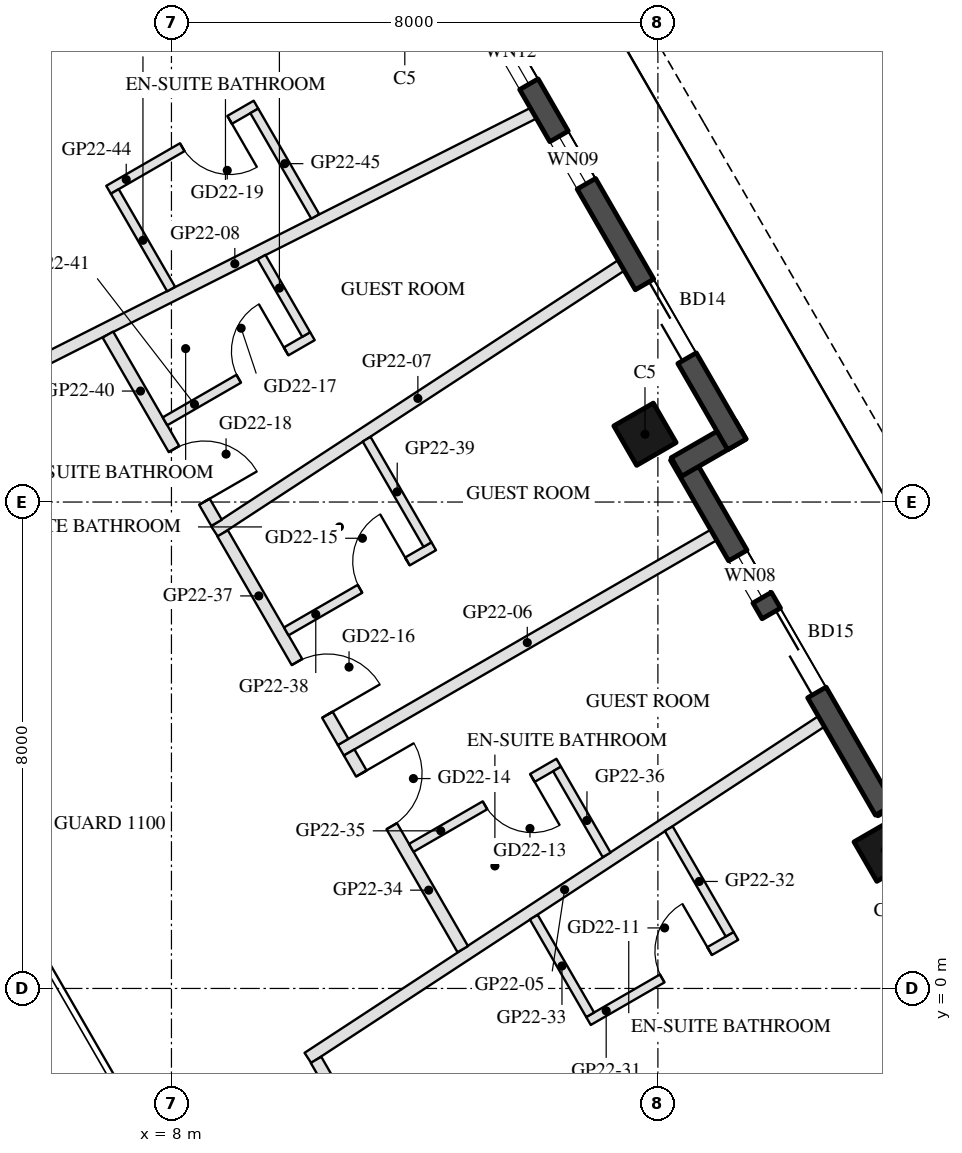
"""IFC4 building model, lengths in metres.
Left out: names, types, materials, properties, quantities, classifications, styles, units other than length and angle.
Written with IfcOpenShell. Run it as: python <this file> out.ifc"""

import sys

from ifc_helpers import new_model, si_unit, direction, frame, frame_2d, origin, origin_2d, place, context, subcontext, project, spatial, rectangle, hollow_rectangle, extrude, element, fill, save


model = new_model("IFC4")
c1 = context("Model", 3, precision=1e-05, world=origin(), true_north=direction((0.0, 1.0)))
c2 = subcontext(c1, "Body", "Model", "MODEL_VIEW")
j1 = project(units=[si_unit("LENGTHUNIT", "METRE"), si_unit("PLANEANGLEUNIT", "RADIAN")], contexts=[c1])
p1 = place(None, origin())
s1 = spatial("IfcSite", under=j1, at=p1, CompositionType="ELEMENT")
p2 = place(p1, origin())
s2 = spatial("IfcBuilding", under=s1, at=p2, CompositionType="ELEMENT")
p3 = place(p2, frame((0.0, 0.0, 228.0)))
s3 = spatial("IfcBuildingStorey", under=s2, at=p3, CompositionType="ELEMENT", Elevation=228.0)
for number, where, z_axis, x_axis in (
    (1, (19.738, 2.273, 0.0), (0.0, 0.0, 1.0), (-0.5, 0.866, 0.0)),
    (2, (15.788, 9.115, 0.0), (0.0, 0.0, 1.0), (-0.5, 0.866, 0.0)),
):
    element("IfcColumn", number, at=place(p3, frame(where, z_axis=z_axis, x_axis=x_axis)), inside=s3, PredefinedType="COLUMN", context=c2, shape_type="SweptSolid", body=[
        extrude(hollow_rectangle(XDim=0.75, YDim=0.75, WallThickness=0.035, at=origin_2d()), origin(), (0.0, 0.0, 1.0), 3.7),
    ])
p4 = place(p3, frame((20.588, 3.601, 0.0), z_axis=(0.0, 0.0, 1.0), x_axis=(-0.866005645448, -0.500034220881, 0.0)))
e3 = element("IfcWall", 3, at=p4, inside=s3, PredefinedType="SOLIDWALL", context=c2, shape_type="SweptSolid", body=[
    extrude(rectangle(XDim=1.22, YDim=0.35, at=frame_2d((0.61, 0.0))), origin(), (0.0, 0.0, 1.0), 3.45),
])
p5 = place(p3, frame((19.729, 2.938, 0.0), z_axis=(0.0, 0.0, 1.0), x_axis=(-0.499976430342, 0.866039011305, 0.0)))
e4 = element("IfcWall", 4, at=p5, inside=s3, PredefinedType="SOLIDWALL", context=c2, shape_type="SweptSolid", body=[
    extrude(rectangle(XDim=6.74, YDim=0.35, at=frame_2d((3.37, 0.0))), origin(), (0.0, 0.0, 1.0), 3.45),
])
p6 = place(p5, frame((2.229, 0.0, 0.0)))
e5 = element("IfcOpeningElement", 5, at=p6, cuts=e4, PredefinedType="OPENING", context=c2, shape_type="SweptSolid", body=[
    extrude(rectangle(XDim=1.5, YDim=2.4, at=frame_2d((0.75, 1.2))), frame((0.0, 0.185, 0.0), z_axis=(0.0, -1.0, 0.0), x_axis=(1.0, 0.0, 0.0)), (0.0, 0.0, 1.0), 0.37),
])
p7 = place(p5, frame((4.029, 0.0, 0.3)))
e6 = element("IfcOpeningElement", 6, at=p7, cuts=e4, PredefinedType="OPENING", context=c2, shape_type="SweptSolid", body=[
    extrude(rectangle(XDim=0.8, YDim=2.65, at=frame_2d((0.4, 1.325))), frame((0.0, 0.185, 0.0), z_axis=(0.0, -1.0, 0.0), x_axis=(1.0, 0.0, 0.0)), (0.0, 0.0, 1.0), 0.37),
])
p8 = place(p3, frame((16.306, 8.577, 0.0), z_axis=(0.0, 0.0, 1.0), x_axis=(0.866092288191, 0.499884134912, 0.0)))
e7 = element("IfcWall", 7, at=p8, inside=s3, PredefinedType="SOLIDWALL", context=c2, shape_type="SweptSolid", body=[
    extrude(rectangle(XDim=1.22, YDim=0.35, at=frame_2d((0.61, 0.0))), origin(), (0.0, 0.0, 1.0), 3.45),
])
p9 = place(p3, frame((17.299, 8.948, 0.0), z_axis=(0.0, 0.0, 1.0), x_axis=(-0.500010041276, 0.866019606374, 0.0)))
e8 = element("IfcWall", 8, at=p9, inside=s3, PredefinedType="SOLIDWALL", context=c2, shape_type="SweptSolid", body=[
    extrude(rectangle(XDim=9.7, YDim=0.35, at=frame_2d((4.85, 0.0))), origin(), (0.0, 0.0, 1.0), 3.45),
])
p10 = place(p9, frame((1.637, 0.0, 0.0)))
e9 = element("IfcOpeningElement", 9, at=p10, cuts=e8, PredefinedType="OPENING", context=c2, shape_type="SweptSolid", body=[
    extrude(rectangle(XDim=1.4, YDim=2.4, at=frame_2d((0.7, 1.2))), frame((0.0, 0.185, 0.0), z_axis=(0.0, -1.0, 0.0), x_axis=(1.0, 0.0, 0.0)), (0.0, 0.0, 1.0), 0.37),
])
p11 = place(p9, frame((4.949, 0.0, 0.3)))
e10 = element("IfcOpeningElement", 10, at=p11, cuts=e8, PredefinedType="OPENING", context=c2, shape_type="SweptSolid", body=[
    extrude(rectangle(XDim=0.9, YDim=2.65, at=frame_2d((0.45, 1.325))), frame((0.0, 0.185, 0.0), z_axis=(0.0, -1.0, 0.0), x_axis=(1.0, 0.0, 0.0)), (0.0, 0.0, 1.0), 0.37),
])
p12 = place(p9, frame((6.84, 0.0, 0.3)))
e11 = element("IfcOpeningElement", 11, at=p12, cuts=e8, PredefinedType="OPENING", context=c2, shape_type="SweptSolid", body=[
    extrude(rectangle(XDim=1.2, YDim=2.65, at=frame_2d((0.6, 1.325))), frame((0.0, 0.185, 0.0), z_axis=(0.0, -1.0, 0.0), x_axis=(1.0, 0.0, 0.0)), (0.0, 0.0, 1.0), 0.37),
])
p13 = place(p3, frame((18.688, 4.391, 0.0), z_axis=(0.0, 0.0, 1.0), x_axis=(-0.836395760685, -0.548126017909, 0.0)))
e12 = element("IfcWall", 12, at=p13, inside=s3, PredefinedType="PARTITIONING", context=c2, shape_type="SweptSolid", body=[
    extrude(rectangle(XDim=10.096, YDim=0.2, at=frame_2d((5.048, 0.0))), origin(), (0.0, 0.0, 1.0), 2.96),
])
p14 = place(p3, frame((16.917, 7.458, 0.0), z_axis=(0.0, 0.0, 1.0), x_axis=(-0.866019052629, -0.500011000363, 0.0)))
e13 = element("IfcWall", 13, at=p14, inside=s3, PredefinedType="PARTITIONING", context=c2, shape_type="SweptSolid", body=[
    extrude(rectangle(XDim=7.08, YDim=0.2, at=frame_2d((3.54, 0.0))), origin(), (0.0, 0.0, 1.0), 2.96),
])
p15 = place(p3, frame((15.397, 11.892, 0.0), z_axis=(0.0, 0.0, 1.0), x_axis=(-0.836905569615, -0.547347300667, 0.0)))
e14 = element("IfcWall", 14, at=p15, inside=s3, PredefinedType="PARTITIONING", context=c2, shape_type="SweptSolid", body=[
    extrude(rectangle(XDim=7.992, YDim=0.2, at=frame_2d((3.996, 0.0))), origin(), (0.0, 0.0, 1.0), 2.96),
])
p16 = place(p3, frame((13.952, 14.395, 0.0), z_axis=(0.0, 0.0, 1.0), x_axis=(-0.892890171934, -0.450274517226, 0.0)))
e15 = element("IfcWall", 15, at=p16, inside=s3, PredefinedType="PARTITIONING", context=c2, shape_type="SweptSolid", body=[
    extrude(rectangle(XDim=10.998, YDim=0.2, at=frame_2d((5.499, 0.0))), origin(), (0.0, 0.0, 1.0), 2.96),
])
p17 = place(p3, frame((10.377, -1.174, 0.0), z_axis=(0.0, 0.0, 1.0), x_axis=(0.500033471514, -0.866006078134, 0.0)))
e16 = element("IfcWall", 16, at=p17, inside=s3, PredefinedType="PARTITIONING", context=c2, shape_type="SweptSolid", body=[
    extrude(rectangle(XDim=3.782, YDim=0.2, at=frame_2d((1.891, 0.0))), origin(), (0.0, 0.0, 1.0), 2.76),
])
p18 = place(p17, frame((1.391, 0.0, 0.0)))
e17 = element("IfcOpeningElement", 17, at=p18, cuts=e16, PredefinedType="OPENING", context=c2, shape_type="SweptSolid", body=[
    extrude(rectangle(XDim=1.0, YDim=2.1, at=frame_2d((0.5, 1.05))), frame((0.0, 0.11, 0.0), z_axis=(0.0, -1.0, 0.0), x_axis=(1.0, 0.0, 0.0)), (0.0, 0.0, 1.0), 0.22),
])
p19 = place(p3, frame((14.858, -0.536, 0.0), z_axis=(0.0, 0.0, 1.0), x_axis=(0.866056369097, 0.49994636267, 0.0)))
e18 = element("IfcWall", 18, at=p19, inside=s3, PredefinedType="PARTITIONING", context=c2, shape_type="SweptSolid", body=[
    extrude(rectangle(XDim=2.8, YDim=0.15, at=frame_2d((1.4, 0.0))), origin(), (0.0, 0.0, 1.0), 2.76),
])
p20 = place(p19, frame((1.4, 0.0, 0.0)))
e19 = element("IfcOpeningElement", 19, at=p20, cuts=e18, PredefinedType="OPENING", context=c2, shape_type="SweptSolid", body=[
    extrude(rectangle(XDim=0.9, YDim=2.1, at=frame_2d((0.45, 1.05))), frame((0.0, 0.085, 0.0), z_axis=(0.0, -1.0, 0.0), x_axis=(1.0, 0.0, 0.0)), (0.0, 0.0, 1.0), 0.17),
])
p21 = place(p3, frame((17.181, 0.892, 0.0), z_axis=(0.0, 0.0, 1.0), x_axis=(-0.500056363668, 0.86599285976, 0.0)))
e20 = element("IfcWall", 20, at=p21, inside=s3, PredefinedType="PARTITIONING", context=c2, shape_type="SweptSolid", body=[
    extrude(rectangle(XDim=2.004, YDim=0.15, at=frame_2d((1.002, 0.0))), origin(), (0.0, 0.0, 1.0), 2.76),
])
p22 = place(p3, frame((14.886, -0.433, 0.0), z_axis=(0.0, 0.0, 1.0), x_axis=(-0.500075767815, 0.865981654797, 0.0)))
e21 = element("IfcWall", 21, at=p22, inside=s3, PredefinedType="PARTITIONING", context=c2, shape_type="SweptSolid", body=[
    extrude(rectangle(XDim=1.854, YDim=0.15, at=frame_2d((0.927, 0.0))), origin(), (0.0, 0.0, 1.0), 2.76),
])
p23 = place(p3, frame((10.923, 3.881, 0.0), z_axis=(0.0, 0.0, 1.0), x_axis=(0.499997756806, -0.866026698889, 0.0)))
e22 = element("IfcWall", 22, at=p23, inside=s3, PredefinedType="PARTITIONING", context=c2, shape_type="SweptSolid", body=[
    extrude(rectangle(XDim=3.736, YDim=0.2, at=frame_2d((1.868, 0.0))), origin(), (0.0, 0.0, 1.0), 2.76),
])
p24 = place(p23, frame((0.4, 0.0, 0.0)))
e23 = element("IfcOpeningElement", 23, at=p24, cuts=e22, PredefinedType="OPENING", context=c2, shape_type="SweptSolid", body=[
    extrude(rectangle(XDim=1.0, YDim=2.1, at=frame_2d((0.5, 1.05))), frame((0.0, 0.11, 0.0), z_axis=(0.0, -1.0, 0.0), x_axis=(1.0, 0.0, 0.0)), (0.0, 0.0, 1.0), 0.22),
])
p25 = place(p3, frame((14.369, 3.712, 0.0), z_axis=(0.0, 0.0, 1.0), x_axis=(-0.866034573852, -0.49998411664, 0.0)))
e24 = element("IfcWall", 24, at=p25, inside=s3, PredefinedType="PARTITIONING", context=c2, shape_type="SweptSolid", body=[
    extrude(rectangle(XDim=2.8, YDim=0.15, at=frame_2d((1.4, 0.0))), origin(), (0.0, 0.0, 1.0), 2.76),
])
p26 = place(p25, frame((0.5, 0.0, 0.0)))
e25 = element("IfcOpeningElement", 25, at=p26, cuts=e24, PredefinedType="OPENING", context=c2, shape_type="SweptSolid", body=[
    extrude(rectangle(XDim=0.9, YDim=2.1, at=frame_2d((0.45, 1.05))), frame((0.0, 0.085, 0.0), z_axis=(0.0, -1.0, 0.0), x_axis=(1.0, 0.0, 0.0)), (0.0, 0.0, 1.0), 0.17),
])
p27 = place(p3, frame((15.157, 2.197, 0.0), z_axis=(0.0, 0.0, 1.0), x_axis=(-0.500033287521, 0.866006184372, 0.0)))
e26 = element("IfcWall", 26, at=p27, inside=s3, PredefinedType="PARTITIONING", context=c2, shape_type="SweptSolid", body=[
    extrude(rectangle(XDim=1.632, YDim=0.15, at=frame_2d((0.816, 0.0))), origin(), (0.0, 0.0, 1.0), 2.76),
])
p28 = place(p3, frame((8.842, 7.485, 0.0), z_axis=(0.0, 0.0, 1.0), x_axis=(0.500030109098, -0.866008019591, 0.0)))
e27 = element("IfcWall", 27, at=p28, inside=s3, PredefinedType="PARTITIONING", context=c2, shape_type="SweptSolid", body=[
    extrude(rectangle(XDim=3.961, YDim=0.2, at=frame_2d((1.98, 0.0))), origin(), (0.0, 0.0, 1.0), 2.76),
])
p29 = place(p28, frame((2.444, 0.0, 0.0)))
e28 = element("IfcOpeningElement", 28, at=p29, cuts=e27, PredefinedType="OPENING", context=c2, shape_type="SweptSolid", body=[
    extrude(rectangle(XDim=1.0, YDim=2.1, at=frame_2d((0.5, 1.05))), frame((0.0, 0.11, 0.0), z_axis=(0.0, -1.0, 0.0), x_axis=(1.0, 0.0, 0.0)), (0.0, 0.0, 1.0), 0.22),
])
p30 = place(p3, frame((9.888, 5.873, 0.0), z_axis=(0.0, 0.0, 1.0), x_axis=(0.866034573852, 0.49998411664, 0.0)))
e29 = element("IfcWall", 29, at=p30, inside=s3, PredefinedType="PARTITIONING", context=c2, shape_type="SweptSolid", body=[
    extrude(rectangle(XDim=2.8, YDim=0.15, at=frame_2d((1.4, 0.0))), origin(), (0.0, 0.0, 1.0), 2.76),
])
p31 = place(p30, frame((1.4, 0.0, 0.0)))
e30 = element("IfcOpeningElement", 30, at=p31, cuts=e29, PredefinedType="OPENING", context=c2, shape_type="SweptSolid", body=[
    extrude(rectangle(XDim=0.9, YDim=2.1, at=frame_2d((0.45, 1.05))), frame((0.0, 0.085, 0.0), z_axis=(0.0, -1.0, 0.0), x_axis=(1.0, 0.0, 0.0)), (0.0, 0.0, 1.0), 0.17),
])
p32 = place(p3, frame((12.211, 7.3, 0.0), z_axis=(0.0, 0.0, 1.0), x_axis=(-0.499982900776, 0.866035275801, 0.0)))
e31 = element("IfcWall", 31, at=p32, inside=s3, PredefinedType="PARTITIONING", context=c2, shape_type="SweptSolid", body=[
    extrude(rectangle(XDim=2.001, YDim=0.15, at=frame_2d((1.001, 0.0))), origin(), (0.0, 0.0, 1.0), 3.45),
])
p33 = place(p3, frame((6.955, 10.754, 0.0), z_axis=(0.0, 0.0, 1.0), x_axis=(0.500018099276, -0.86601495391, 0.0)))
e32 = element("IfcWall", 32, at=p33, inside=s3, PredefinedType="PARTITIONING", context=c2, shape_type="SweptSolid", body=[
    extrude(rectangle(XDim=3.574, YDim=0.2, at=frame_2d((1.787, 0.0))), origin(), (0.0, 0.0, 1.0), 2.76),
])
p34 = place(p33, frame((2.174, 0.0, 0.0)))
e33 = element("IfcOpeningElement", 33, at=p34, cuts=e32, PredefinedType="OPENING", context=c2, shape_type="SweptSolid", body=[
    extrude(rectangle(XDim=1.0, YDim=2.1, at=frame_2d((0.5, 1.05))), frame((0.0, 0.11, 0.0), z_axis=(0.0, -1.0, 0.0), x_axis=(1.0, 0.0, 0.0)), (0.0, 0.0, 1.0), 0.22),
])
p35 = place(p3, frame((7.894, 9.327, 0.0), z_axis=(0.0, 0.0, 1.0), x_axis=(0.865996816683, 0.500049511043, 0.0)))
e34 = element("IfcWall", 34, at=p35, inside=s3, PredefinedType="PARTITIONING", context=c2, shape_type="SweptSolid", body=[
    extrude(rectangle(XDim=2.8, YDim=0.15, at=frame_2d((1.4, 0.0))), origin(), (0.0, 0.0, 1.0), 2.76),
])
p36 = place(p35, frame((1.4, 0.0, 0.0)))
e35 = element("IfcOpeningElement", 35, at=p36, cuts=e34, PredefinedType="OPENING", context=c2, shape_type="SweptSolid", body=[
    extrude(rectangle(XDim=0.9, YDim=2.1, at=frame_2d((0.45, 1.05))), frame((0.0, 0.085, 0.0), z_axis=(0.0, -1.0, 0.0), x_axis=(1.0, 0.0, 0.0)), (0.0, 0.0, 1.0), 0.17),
])
p37 = place(p3, frame((10.216, 10.755, 0.0), z_axis=(0.0, 0.0, 1.0), x_axis=(-0.50001473959, 0.866016893711, 0.0)))
e36 = element("IfcWall", 36, at=p37, inside=s3, PredefinedType="PARTITIONING", context=c2, shape_type="SweptSolid", body=[
    extrude(rectangle(XDim=1.47, YDim=0.15, at=frame_2d((0.735, 0.0))), origin(), (0.0, 0.0, 1.0), 3.45),
])
p38 = place(p3, frame((9.39, 14.536, 0.0), z_axis=(0.0, 0.0, 1.0), x_axis=(-0.866034573852, -0.49998411664, 0.0)))
e37 = element("IfcWall", 37, at=p38, inside=s3, PredefinedType="PARTITIONING", context=c2, shape_type="SweptSolid", body=[
    extrude(rectangle(XDim=2.8, YDim=0.15, at=frame_2d((1.4, 0.0))), origin(), (0.0, 0.0, 1.0), 2.76),
])
p39 = place(p38, frame((0.5, 0.0, 0.0)))
e38 = element("IfcOpeningElement", 38, at=p39, cuts=e37, PredefinedType="OPENING", context=c2, shape_type="SweptSolid", body=[
    extrude(rectangle(XDim=0.9, YDim=2.1, at=frame_2d((0.45, 1.05))), frame((0.0, 0.085, 0.0), z_axis=(0.0, -1.0, 0.0), x_axis=(1.0, 0.0, 0.0)), (0.0, 0.0, 1.0), 0.17),
])
p40 = place(p3, frame((10.365, 12.698, 0.0), z_axis=(0.0, 0.0, 1.0), x_axis=(-0.500056363668, 0.86599285976, 0.0)))
e39 = element("IfcWall", 39, at=p40, inside=s3, PredefinedType="PARTITIONING", context=c2, shape_type="SweptSolid", body=[
    extrude(rectangle(XDim=2.004, YDim=0.15, at=frame_2d((1.002, 0.0))), origin(), (0.0, 0.0, 1.0), 2.76),
])
p41 = place(p3, frame((7.995, 11.502, 0.0), z_axis=(0.0, 0.0, 1.0), x_axis=(-0.4999770169, 0.866038672677, 0.0)))
e40 = element("IfcWall", 40, at=p41, inside=s3, PredefinedType="PARTITIONING", context=c2, shape_type="SweptSolid", body=[
    extrude(rectangle(XDim=1.854, YDim=0.15, at=frame_2d((0.927, 0.0))), origin(), (0.0, 0.0, 1.0), 2.76),
])
p42 = place(p6, frame((1.5, 0.0, 0.0), z_axis=(0.0, 0.0, 1.0), x_axis=(-1.0, 0.0, 0.0)))
e41 = element("IfcDoor", 41, at=p42, inside=s3, OperationType="SLIDING_TO_LEFT", PredefinedType="DOOR", context=c2, shape_type="SweptSolid", body=[
    extrude(rectangle(XDim=1.5, YDim=2.4, at=frame_2d((0.75, 1.2))), frame((0.0, 0.025, 0.0), z_axis=(0.0, -1.0, 0.0), x_axis=(1.0, 0.0, 0.0)), (0.0, 0.0, 1.0), 0.05),
])
fill(e5, e41)
p43 = place(p7, origin())
e42 = element("IfcWindow", 42, at=p43, inside=s3, PartitioningType="SINGLE_PANEL", PredefinedType="WINDOW", context=c2, shape_type="SweptSolid", body=[
    extrude(rectangle(XDim=0.8, YDim=2.65, at=frame_2d((0.4, 1.325))), frame((0.0, 0.03, 0.0), z_axis=(0.0, -1.0, 0.0), x_axis=(1.0, 0.0, 0.0)), (0.0, 0.0, 1.0), 0.06),
])
fill(e6, e42)
p44 = place(p10, frame((1.4, 0.0, 0.0), z_axis=(0.0, 0.0, 1.0), x_axis=(-1.0, 0.0, 0.0)))
e43 = element("IfcDoor", 43, at=p44, inside=s3, OperationType="SLIDING_TO_LEFT", PredefinedType="DOOR", context=c2, shape_type="SweptSolid", body=[
    extrude(rectangle(XDim=1.4, YDim=2.4, at=frame_2d((0.7, 1.2))), frame((0.0, 0.025, 0.0), z_axis=(0.0, -1.0, 0.0), x_axis=(1.0, 0.0, 0.0)), (0.0, 0.0, 1.0), 0.05),
])
fill(e9, e43)
p45 = place(p11, origin())
e44 = element("IfcWindow", 44, at=p45, inside=s3, PartitioningType="SINGLE_PANEL", PredefinedType="WINDOW", context=c2, shape_type="SweptSolid", body=[
    extrude(rectangle(XDim=0.9, YDim=2.65, at=frame_2d((0.45, 1.325))), frame((0.0, 0.03, 0.0), z_axis=(0.0, -1.0, 0.0), x_axis=(1.0, 0.0, 0.0)), (0.0, 0.0, 1.0), 0.06),
])
fill(e10, e44)
p46 = place(p12, origin())
e45 = element("IfcWindow", 45, at=p46, inside=s3, PartitioningType="SINGLE_PANEL", PredefinedType="WINDOW", context=c2, shape_type="SweptSolid", body=[
    extrude(rectangle(XDim=1.2, YDim=2.65, at=frame_2d((0.6, 1.325))), frame((0.0, 0.03, 0.0), z_axis=(0.0, -1.0, 0.0), x_axis=(1.0, 0.0, 0.0)), (0.0, 0.0, 1.0), 0.06),
])
fill(e11, e45)
p47 = place(p20, origin())
e46 = element("IfcDoor", 46, at=p47, inside=s3, OperationType="SINGLE_SWING_RIGHT", PredefinedType="DOOR", context=c2, shape_type="SweptSolid", body=[
    extrude(rectangle(XDim=0.9, YDim=2.1, at=frame_2d((0.45, 1.05))), frame((0.0, 0.025, 0.0), z_axis=(0.0, -1.0, 0.0), x_axis=(1.0, 0.0, 0.0)), (0.0, 0.0, 1.0), 0.05),
])
fill(e19, e46)
p48 = place(p26, origin())
e47 = element("IfcDoor", 47, at=p48, inside=s3, OperationType="SINGLE_SWING_LEFT", PredefinedType="DOOR", context=c2, shape_type="SweptSolid", body=[
    extrude(rectangle(XDim=0.9, YDim=2.1, at=frame_2d((0.45, 1.05))), frame((0.0, 0.025, 0.0), z_axis=(0.0, -1.0, 0.0), x_axis=(1.0, 0.0, 0.0)), (0.0, 0.0, 1.0), 0.05),
])
fill(e25, e47)
p49 = place(p24, origin())
e48 = element("IfcDoor", 48, at=p49, inside=s3, OperationType="SINGLE_SWING_LEFT", PredefinedType="DOOR", context=c2, shape_type="SweptSolid", body=[
    extrude(rectangle(XDim=1.0, YDim=2.1, at=frame_2d((0.5, 1.05))), frame((0.0, 0.025, 0.0), z_axis=(0.0, -1.0, 0.0), x_axis=(1.0, 0.0, 0.0)), (0.0, 0.0, 1.0), 0.05),
])
fill(e23, e48)
p50 = place(p31, origin())
e49 = element("IfcDoor", 49, at=p50, inside=s3, OperationType="SINGLE_SWING_RIGHT", PredefinedType="DOOR", context=c2, shape_type="SweptSolid", body=[
    extrude(rectangle(XDim=0.9, YDim=2.1, at=frame_2d((0.45, 1.05))), frame((0.0, 0.025, 0.0), z_axis=(0.0, -1.0, 0.0), x_axis=(1.0, 0.0, 0.0)), (0.0, 0.0, 1.0), 0.05),
])
fill(e30, e49)
p51 = place(p29, origin())
e50 = element("IfcDoor", 50, at=p51, inside=s3, OperationType="SINGLE_SWING_RIGHT", PredefinedType="DOOR", context=c2, shape_type="SweptSolid", body=[
    extrude(rectangle(XDim=1.0, YDim=2.1, at=frame_2d((0.5, 1.05))), frame((0.0, 0.025, 0.0), z_axis=(0.0, -1.0, 0.0), x_axis=(1.0, 0.0, 0.0)), (0.0, 0.0, 1.0), 0.05),
])
fill(e28, e50)
p52 = place(p36, origin())
e51 = element("IfcDoor", 51, at=p52, inside=s3, OperationType="SINGLE_SWING_RIGHT", PredefinedType="DOOR", context=c2, shape_type="SweptSolid", body=[
    extrude(rectangle(XDim=0.9, YDim=2.1, at=frame_2d((0.45, 1.05))), frame((0.0, 0.025, 0.0), z_axis=(0.0, -1.0, 0.0), x_axis=(1.0, 0.0, 0.0)), (0.0, 0.0, 1.0), 0.05),
])
fill(e35, e51)
p53 = place(p34, origin())
e52 = element("IfcDoor", 52, at=p53, inside=s3, OperationType="SINGLE_SWING_RIGHT", PredefinedType="DOOR", context=c2, shape_type="SweptSolid", body=[
    extrude(rectangle(XDim=1.0, YDim=2.1, at=frame_2d((0.5, 1.05))), frame((0.0, 0.025, 0.0), z_axis=(0.0, -1.0, 0.0), x_axis=(1.0, 0.0, 0.0)), (0.0, 0.0, 1.0), 0.05),
])
fill(e33, e52)
p54 = place(p39, origin())
e53 = element("IfcDoor", 53, at=p54, inside=s3, OperationType="SINGLE_SWING_LEFT", PredefinedType="DOOR", context=c2, shape_type="SweptSolid", body=[
    extrude(rectangle(XDim=0.9, YDim=2.1, at=frame_2d((0.45, 1.05))), frame((0.0, 0.025, 0.0), z_axis=(0.0, -1.0, 0.0), x_axis=(1.0, 0.0, 0.0)), (0.0, 0.0, 1.0), 0.05),
])
fill(e38, e53)
save(model, sys.argv[1])
